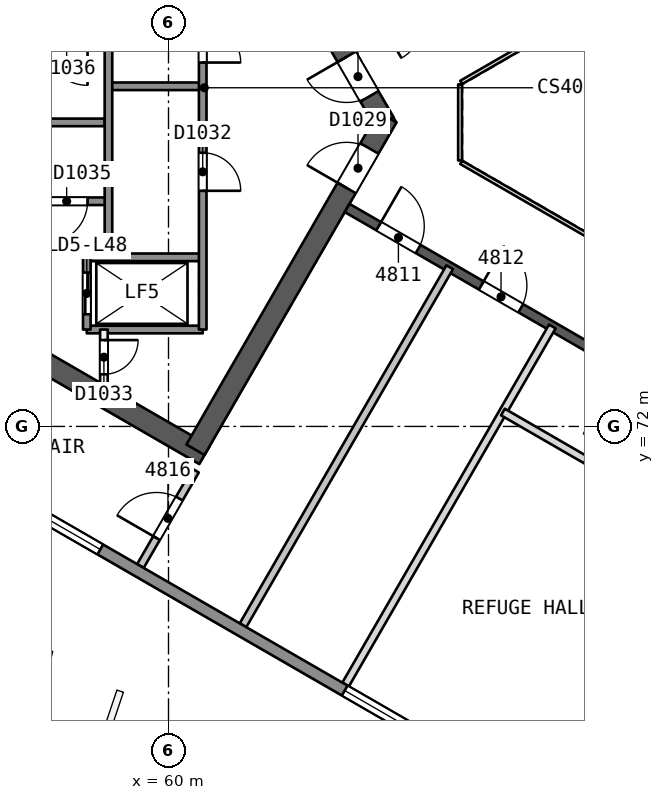
"""IFC4 building model, lengths in metres.
Left out: names, types, materials, properties, quantities, classifications, styles, units other than length and angle.
Written with IfcOpenShell. Run it as: python <this file> out.ifc"""

import sys

from ifc_helpers import new_model, si_unit, direction, frame, frame_2d, origin, place, context, subcontext, project, spatial, rectangle, extrude, element, fill, save


model = new_model("IFC4")
c1 = context("Model", 3, precision=1e-05, world=origin(), true_north=direction((0.0, 1.0)))
c2 = subcontext(c1, "Body", "Model", "MODEL_VIEW")
j1 = project(units=[si_unit("LENGTHUNIT", "METRE"), si_unit("PLANEANGLEUNIT", "RADIAN")], contexts=[c1])
p1 = place(None, origin())
s1 = spatial("IfcSite", under=j1, at=p1, CompositionType="ELEMENT")
p2 = place(p1, origin())
s2 = spatial("IfcBuilding", under=s1, at=p2, CompositionType="ELEMENT")
p3 = place(p2, frame((0.0, 0.0, 197.0)))
s3 = spatial("IfcBuildingStorey", under=s2, at=p3, CompositionType="ELEMENT", Elevation=197.0)
p4 = place(p3, frame((65.682, 80.0, 0.0), z_axis=(0.0, 0.0, 1.0), x_axis=(-0.500000202252, 0.866025287014, 0.0)))
e1 = element("IfcWall", 1, at=p4, inside=s3, PredefinedType="SHEAR", context=c2, shape_type="SweptSolid", body=[
    extrude(rectangle(XDim=10.221, YDim=0.55, at=frame_2d((5.111, 0.0))), origin(), (0.0, 0.0, 1.0), 4.4),
])
p5 = place(p4, frame((0.791, 0.0, 0.0)))
e2 = element("IfcOpeningElement", 2, at=p5, cuts=e1, PredefinedType="OPENING", context=c2, shape_type="SweptSolid", body=[
    extrude(rectangle(XDim=1.2, YDim=2.1, at=frame_2d((0.6, 1.05))), frame((0.0, 0.286, 0.0), z_axis=(0.0, -1.0, 0.0), x_axis=(1.0, 0.0, 0.0)), (0.0, 0.0, 1.0), 0.571),
])
p6 = place(p3, frame((60.709, 88.614, 0.0), z_axis=(0.0, 0.0, 1.0), x_axis=(-0.866020164116, -0.500009075263, 0.0)))
e3 = element("IfcWall", 3, at=p6, inside=s3, PredefinedType="SHEAR", context=c2, shape_type="SweptSolid", body=[
    extrude(rectangle(XDim=14.058, YDim=0.55, at=frame_2d((7.029, 0.0))), origin(), (0.0, 0.0, 1.0), 4.4),
])
p7 = place(p6, frame((6.475, 0.0, 0.0)))
e4 = element("IfcOpeningElement", 4, at=p7, cuts=e3, PredefinedType="OPENING", context=c2, shape_type="SweptSolid", body=[
    extrude(rectangle(XDim=1.1, YDim=2.1, at=frame_2d((0.55, 1.05))), frame((0.0, 0.286, 0.0), z_axis=(0.0, -1.0, 0.0), x_axis=(1.0, 0.0, 0.0)), (0.0, 0.0, 1.0), 0.571),
])
p8 = place(p3, frame((48.672, 78.336, 0.0), z_axis=(0.0, 0.0, 1.0), x_axis=(0.866023530946, -0.500003243837, 0.0)))
e5 = element("IfcWall", 5, at=p8, inside=s3, PredefinedType="SHEAR", context=c2, shape_type="SweptSolid", body=[
    extrude(rectangle(XDim=14.175, YDim=0.55, at=frame_2d((7.087, 0.0))), origin(), (0.0, 0.0, 1.0), 4.4),
])
p9 = place(p3, frame((60.709, 71.386, 0.0), z_axis=(0.0, 0.0, 1.0), x_axis=(0.500015938302, 0.866016201606, 0.0)))
e6 = element("IfcWall", 6, at=p9, inside=s3, PredefinedType="SHEAR", context=c2, shape_type="SweptSolid", body=[
    extrude(rectangle(XDim=10.105, YDim=0.55, at=frame_2d((5.053, 0.0))), origin(), (0.0, 0.0, 1.0), 4.4),
])
p10 = place(p9, frame((7.955, 0.0, 0.0)))
e7 = element("IfcOpeningElement", 7, at=p10, cuts=e6, PredefinedType="OPENING", context=c2, shape_type="SweptSolid", body=[
    extrude(rectangle(XDim=1.2, YDim=2.1, at=frame_2d((0.6, 1.05))), frame((0.0, 0.286, 0.0), z_axis=(0.0, -1.0, 0.0), x_axis=(1.0, 0.0, 0.0)), (0.0, 0.0, 1.0), 0.571),
])
p11 = place(p3, frame((64.7, 77.748, 0.0), z_axis=(0.0, 0.0, 1.0), x_axis=(0.866026492143, -0.499998114903, 0.0)))
e8 = element("IfcWall", 8, at=p11, inside=s3, PredefinedType="SHEAR", context=c2, shape_type="SweptSolid", body=[
    extrude(rectangle(XDim=15.588, YDim=0.25, at=frame_2d((7.794, 0.0))), origin(), (0.0, 0.0, 1.0), 3.95),
])
p12 = place(p11, frame((0.959, 0.0, 0.0)))
e9 = element("IfcOpeningElement", 9, at=p12, cuts=e8, PredefinedType="OPENING", context=c2, shape_type="SweptSolid", body=[
    extrude(rectangle(XDim=1.2, YDim=2.4, at=frame_2d((0.6, 1.2))), frame((0.0, 0.135, 0.0), z_axis=(0.0, -1.0, 0.0), x_axis=(1.0, 0.0, 0.0)), (0.0, 0.0, 1.0), 0.271),
])
p13 = place(p11, frame((4.076, 0.0, 0.0)))
e10 = element("IfcOpeningElement", 10, at=p13, cuts=e8, PredefinedType="OPENING", context=c2, shape_type="SweptSolid", body=[
    extrude(rectangle(XDim=1.2, YDim=2.4, at=frame_2d((0.6, 1.2))), frame((0.0, 0.135, 0.0), z_axis=(0.0, -1.0, 0.0), x_axis=(1.0, 0.0, 0.0)), (0.0, 0.0, 1.0), 0.271),
])
p14 = place(p11, frame((8.753, 0.0, 0.0)))
e11 = element("IfcOpeningElement", 11, at=p14, cuts=e8, PredefinedType="OPENING", context=c2, shape_type="SweptSolid", body=[
    extrude(rectangle(XDim=1.2, YDim=2.4, at=frame_2d((0.6, 1.2))), frame((0.0, 0.135, 0.0), z_axis=(0.0, -1.0, 0.0), x_axis=(1.0, 0.0, 0.0)), (0.0, 0.0, 1.0), 0.271),
])
p15 = place(p11, frame((13.43, 0.0, 0.0)))
e12 = element("IfcOpeningElement", 12, at=p15, cuts=e8, PredefinedType="OPENING", context=c2, shape_type="SweptSolid", body=[
    extrude(rectangle(XDim=1.2, YDim=2.4, at=frame_2d((0.6, 1.2))), frame((0.0, 0.135, 0.0), z_axis=(0.0, -1.0, 0.0), x_axis=(1.0, 0.0, 0.0)), (0.0, 0.0, 1.0), 0.271),
])
p16 = place(p3, frame((61.96, 66.768, 0.0), z_axis=(0.0, 0.0, 1.0), x_axis=(0.49999829022, 0.866026390924, 0.0)))
e13 = element("IfcWall", 13, at=p16, inside=s3, PredefinedType="PARTITIONING", context=c2, shape_type="SweptSolid", body=[
    extrude(rectangle(XDim=10.879, YDim=0.2, at=frame_2d((5.44, 0.0))), origin(), (0.0, 0.0, 1.0), 3.95),
])
p17 = place(p3, frame((59.26, 68.326, 0.0), z_axis=(0.0, 0.0, 1.0), x_axis=(0.499977468037, 0.866038412228, 0.0)))
e14 = element("IfcWall", 14, at=p17, inside=s3, PredefinedType="PARTITIONING", context=c2, shape_type="SweptSolid", body=[
    extrude(rectangle(XDim=2.901, YDim=0.2, at=frame_2d((1.45, 0.0))), origin(), (0.0, 0.0, 1.0), 3.95),
])
p18 = place(p17, frame((0.85, 0.0, 0.0)))
e15 = element("IfcOpeningElement", 15, at=p18, cuts=e14, PredefinedType="OPENING", context=c2, shape_type="SweptSolid", body=[
    extrude(rectangle(XDim=1.2, YDim=2.4, at=frame_2d((0.6, 1.2))), frame((0.0, 0.11, 0.0), z_axis=(0.0, -1.0, 0.0), x_axis=(1.0, 0.0, 0.0)), (0.0, 0.0, 1.0), 0.221),
])
p19 = place(p3, frame((64.66, 65.209, 0.0), z_axis=(0.0, 0.0, 1.0), x_axis=(0.500015120401, 0.866016673841, 0.0)))
e16 = element("IfcWall", 16, at=p19, inside=s3, PredefinedType="PARTITIONING", context=c2, shape_type="SweptSolid", body=[
    extrude(rectangle(XDim=10.88, YDim=0.2, at=frame_2d((5.44, 0.0))), origin(), (0.0, 0.0, 1.0), 3.95),
])
p20 = place(p3, frame((68.8, 72.379, 0.0), z_axis=(0.0, 0.0, 1.0), x_axis=(0.866022576681, -0.500004896655, 0.0)))
e17 = element("IfcWall", 17, at=p20, inside=s3, PredefinedType="PARTITIONING", context=c2, shape_type="SweptSolid", body=[
    extrude(rectangle(XDim=6.235, YDim=0.2, at=frame_2d((3.118, 0.0))), origin(), (0.0, 0.0, 1.0), 3.95),
])
p21 = place(p20, frame((2.518, 0.0, 0.0)))
e18 = element("IfcOpeningElement", 18, at=p21, cuts=e17, PredefinedType="OPENING", context=c2, shape_type="SweptSolid", body=[
    extrude(rectangle(XDim=1.2, YDim=2.4, at=frame_2d((0.6, 1.2))), frame((0.0, 0.11, 0.0), z_axis=(0.0, -1.0, 0.0), x_axis=(1.0, 0.0, 0.0)), (0.0, 0.0, 1.0), 0.221),
])
p22 = place(p3, frame((70.06, 62.091, 0.0), z_axis=(0.0, 0.0, 1.0), x_axis=(0.49999829022, 0.866026390924, 0.0)))
e19 = element("IfcWall", 19, at=p22, inside=s3, PredefinedType="PARTITIONING", context=c2, shape_type="SweptSolid", body=[
    extrude(rectangle(XDim=10.879, YDim=0.2, at=frame_2d((5.44, 0.0))), origin(), (0.0, 0.0, 1.0), 3.95),
])
p23 = place(p3, frame((88.51, 51.267, 0.0), z_axis=(0.0, 0.0, 1.0), x_axis=(-0.866025243948, 0.500000276845, 0.0)))
e20 = element("IfcWall", 20, at=p23, inside=s3, PredefinedType="SOLIDWALL", context=c2, shape_type="SweptSolid", body=[
    extrude(rectangle(XDim=52.132, YDim=0.3, at=frame_2d((26.066, 0.0))), origin(), (0.0, 0.0, 1.0), 3.95),
])
p24 = place(p23, frame((42.139, 0.0, 0.9)))
e21 = element("IfcOpeningElement", 21, at=p24, cuts=e20, PredefinedType="OPENING", context=c2, shape_type="SweptSolid", body=[
    extrude(rectangle(XDim=1.8, YDim=1.5, at=frame_2d((0.9, 0.75))), frame((0.0, 0.161, 0.0), z_axis=(0.0, -1.0, 0.0), x_axis=(1.0, 0.0, 0.0)), (0.0, 0.0, 1.0), 0.321),
])
p25 = place(p23, frame((8.193, 0.0, 0.9)))
e22 = element("IfcOpeningElement", 22, at=p25, cuts=e20, PredefinedType="OPENING", context=c2, shape_type="SweptSolid", body=[
    extrude(rectangle(XDim=1.8, YDim=1.5, at=frame_2d((0.9, 0.75))), frame((0.0, 0.161, 0.0), z_axis=(0.0, -1.0, 0.0), x_axis=(1.0, 0.0, 0.0)), (0.0, 0.0, 1.0), 0.321),
])
p26 = place(p23, frame((3.713, 0.0, 0.6)))
e23 = element("IfcOpeningElement", 23, at=p26, cuts=e20, PredefinedType="OPENING", context=c2, shape_type="SweptSolid", body=[
    extrude(rectangle(XDim=3.0, YDim=2.4, at=frame_2d((1.5, 1.2))), frame((0.0, 0.161, 0.0), z_axis=(0.0, -1.0, 0.0), x_axis=(1.0, 0.0, 0.0)), (0.0, 0.0, 1.0), 0.321),
])
p27 = place(p23, frame((14.14, 0.0, 0.6)))
e24 = element("IfcOpeningElement", 24, at=p27, cuts=e20, PredefinedType="OPENING", context=c2, shape_type="SweptSolid", body=[
    extrude(rectangle(XDim=3.0, YDim=2.4, at=frame_2d((1.5, 1.2))), frame((0.0, 0.161, 0.0), z_axis=(0.0, -1.0, 0.0), x_axis=(1.0, 0.0, 0.0)), (0.0, 0.0, 1.0), 0.321),
])
p28 = place(p23, frame((24.566, 0.0, 0.6)))
e25 = element("IfcOpeningElement", 25, at=p28, cuts=e20, PredefinedType="OPENING", context=c2, shape_type="SweptSolid", body=[
    extrude(rectangle(XDim=3.0, YDim=2.4, at=frame_2d((1.5, 1.2))), frame((0.0, 0.161, 0.0), z_axis=(0.0, -1.0, 0.0), x_axis=(1.0, 0.0, 0.0)), (0.0, 0.0, 1.0), 0.321),
])
p29 = place(p23, frame((34.992, 0.0, 0.6)))
e26 = element("IfcOpeningElement", 26, at=p29, cuts=e20, PredefinedType="OPENING", context=c2, shape_type="SweptSolid", body=[
    extrude(rectangle(XDim=3.0, YDim=2.4, at=frame_2d((1.5, 1.2))), frame((0.0, 0.161, 0.0), z_axis=(0.0, -1.0, 0.0), x_axis=(1.0, 0.0, 0.0)), (0.0, 0.0, 1.0), 0.321),
])
p30 = place(p23, frame((45.419, 0.0, 0.6)))
e27 = element("IfcOpeningElement", 27, at=p30, cuts=e20, PredefinedType="OPENING", context=c2, shape_type="SweptSolid", body=[
    extrude(rectangle(XDim=3.0, YDim=2.4, at=frame_2d((1.5, 1.2))), frame((0.0, 0.161, 0.0), z_axis=(0.0, -1.0, 0.0), x_axis=(1.0, 0.0, 0.0)), (0.0, 0.0, 1.0), 0.321),
])
p31 = place(p3, frame((60.9, 80.95, 0.0), z_axis=(0.0, 0.0, 1.0), x_axis=(-1.0, 0.0, 0.0)))
e28 = element("IfcWall", 28, at=p31, inside=s3, PredefinedType="SOLIDWALL", context=c2, shape_type="SweptSolid", body=[
    extrude(rectangle(XDim=2.48, YDim=0.2, at=frame_2d((1.24, 0.0))), origin(), (0.0, 0.0, 1.0), 3.95),
])
p32 = place(p3, frame((58.32, 80.0, 0.0), z_axis=(0.0, 0.0, 1.0), x_axis=(-1.0, 0.0, 0.0)))
e29 = element("IfcWall", 29, at=p32, inside=s3, PredefinedType="SOLIDWALL", context=c2, shape_type="SweptSolid", body=[
    extrude(rectangle(XDim=2.2, YDim=0.2, at=frame_2d((1.1, 0.0))), origin(), (0.0, 0.0, 1.0), 3.95),
])
p33 = place(p3, frame((58.42, 77.925, 0.0), z_axis=(0.0, 0.0, 1.0), x_axis=(-1.0, 0.0, 0.0)))
e30 = element("IfcWall", 30, at=p33, inside=s3, PredefinedType="SOLIDWALL", context=c2, shape_type="SweptSolid", body=[
    extrude(rectangle(XDim=7.7, YDim=0.2, at=frame_2d((3.85, 0.0))), origin(), (0.0, 0.0, 1.0), 3.95),
])
p34 = place(p33, frame((0.55, 0.0, 0.0)))
e31 = element("IfcOpeningElement", 31, at=p34, cuts=e30, PredefinedType="OPENING", context=c2, shape_type="SweptSolid", body=[
    extrude(rectangle(XDim=1.1, YDim=2.1, at=frame_2d((0.55, 1.05))), frame((0.0, 0.11, 0.0), z_axis=(0.0, -1.0, 0.0), x_axis=(1.0, 0.0, 0.0)), (0.0, 0.0, 1.0), 0.221),
])
for number, where, z_axis, x_axis in (
    (32, (60.9, 76.45, 0.0), (0.0, 0.0, 1.0), (-1.0, 0.0, 0.0)),
    (33, (60.9, 74.55, 0.0), (0.0, 0.0, 1.0), (-1.0, 0.0, 0.0)),
):
    element("IfcWall", number, at=place(p3, frame(where, z_axis=z_axis, x_axis=x_axis)), inside=s3, PredefinedType="SOLIDWALL", context=c2, shape_type="SweptSolid", body=[
        extrude(rectangle(XDim=3.05, YDim=0.2, at=frame_2d((1.525, 0.0))), origin(), (0.0, 0.0, 1.0), 3.95),
    ])
p35 = place(p3, frame((60.9, 85.45, 0.0), z_axis=(0.0, 0.0, 1.0), x_axis=(0.0, -1.0, 0.0)))
e34 = element("IfcWall", 34, at=p35, inside=s3, PredefinedType="SOLIDWALL", context=c2, shape_type="SweptSolid", body=[
    extrude(rectangle(XDim=10.9, YDim=0.2, at=frame_2d((5.45, 0.0))), origin(), (0.0, 0.0, 1.0), 3.95),
])
p36 = place(p35, frame((0.625, 0.0, 0.0)))
e35 = element("IfcOpeningElement", 35, at=p36, cuts=e34, PredefinedType="OPENING", context=c2, shape_type="SweptSolid", body=[
    extrude(rectangle(XDim=1.0, YDim=2.1, at=frame_2d((0.5, 1.05))), frame((0.0, 0.11, 0.0), z_axis=(0.0, -1.0, 0.0), x_axis=(1.0, 0.0, 0.0)), (0.0, 0.0, 1.0), 0.221),
])
p37 = place(p35, frame((2.875, 0.0, 0.0)))
e36 = element("IfcOpeningElement", 36, at=p37, cuts=e34, PredefinedType="OPENING", context=c2, shape_type="SweptSolid", body=[
    extrude(rectangle(XDim=1.0, YDim=2.1, at=frame_2d((0.5, 1.05))), frame((0.0, 0.11, 0.0), z_axis=(0.0, -1.0, 0.0), x_axis=(1.0, 0.0, 0.0)), (0.0, 0.0, 1.0), 0.221),
])
p38 = place(p35, frame((6.25, 0.0, 0.0)))
e37 = element("IfcOpeningElement", 37, at=p38, cuts=e34, PredefinedType="OPENING", context=c2, shape_type="SweptSolid", body=[
    extrude(rectangle(XDim=1.0, YDim=2.1, at=frame_2d((0.5, 1.05))), frame((0.0, 0.11, 0.0), z_axis=(0.0, -1.0, 0.0), x_axis=(1.0, 0.0, 0.0)), (0.0, 0.0, 1.0), 0.221),
])
p39 = place(p3, frame((58.42, 86.974, 0.0), z_axis=(0.0, 0.0, 1.0), x_axis=(0.0, -1.0, 0.0)))
e38 = element("IfcWall", 38, at=p39, inside=s3, PredefinedType="SOLIDWALL", context=c2, shape_type="SweptSolid", body=[
    extrude(rectangle(XDim=10.524, YDim=0.2, at=frame_2d((5.262, 0.0))), origin(), (0.0, 0.0, 1.0), 3.95),
])
p40 = place(p39, frame((0.312, 0.0, 0.0)))
e39 = element("IfcOpeningElement", 39, at=p40, cuts=e38, PredefinedType="OPENING", context=c2, shape_type="SweptSolid", body=[
    extrude(rectangle(XDim=0.9, YDim=2.1, at=frame_2d((0.45, 1.05))), frame((0.0, 0.11, 0.0), z_axis=(0.0, -1.0, 0.0), x_axis=(1.0, 0.0, 0.0)), (0.0, 0.0, 1.0), 0.221),
])
p41 = place(p3, frame((58.3, 74.55, 0.0), z_axis=(0.0, 0.0, 1.0), x_axis=(0.0, -1.0, 0.0)))
e40 = element("IfcWall", 40, at=p41, inside=s3, PredefinedType="PARTITIONING", context=c2, shape_type="SweptSolid", body=[
    extrude(rectangle(XDim=1.455, YDim=0.2, at=frame_2d((0.728, 0.0))), origin(), (0.0, 0.0, 1.0), 3.95),
])
p42 = place(p41, frame((0.278, 0.0, 0.0)))
e41 = element("IfcOpeningElement", 41, at=p42, cuts=e40, PredefinedType="OPENING", context=c2, shape_type="SweptSolid", body=[
    extrude(rectangle(XDim=0.9, YDim=2.1, at=frame_2d((0.45, 1.05))), frame((0.0, 0.11, 0.0), z_axis=(0.0, -1.0, 0.0), x_axis=(1.0, 0.0, 0.0)), (0.0, 0.0, 1.0), 0.221),
])
p43 = place(p3, frame((57.85, 76.45, 0.0), z_axis=(0.0, 0.0, 1.0), x_axis=(0.0, -1.0, 0.0)))
e42 = element("IfcWall", 42, at=p43, inside=s3, PredefinedType="SOLIDWALL", context=c2, shape_type="SweptSolid", body=[
    extrude(rectangle(XDim=1.9, YDim=0.2, at=frame_2d((0.95, 0.0))), origin(), (0.0, 0.0, 1.0), 3.95),
])
p44 = place(p43, frame((0.4, 0.0, 0.0)))
e43 = element("IfcOpeningElement", 43, at=p44, cuts=e42, PredefinedType="OPENING", context=c2, shape_type="SweptSolid", body=[
    extrude(rectangle(XDim=1.1, YDim=2.1, at=frame_2d((0.55, 1.05))), frame((0.0, 0.11, 0.0), z_axis=(0.0, -1.0, 0.0), x_axis=(1.0, 0.0, 0.0)), (0.0, 0.0, 1.0), 0.221),
])
p45 = place(p3, frame((77.738, 86.846, 0.0), z_axis=(0.0, 0.0, 1.0), x_axis=(-0.866026658274, -0.499997827154, 0.0)))
e44 = element("IfcWall", 44, at=p45, inside=s3, PredefinedType="PARTITIONING", context=c2, shape_type="SweptSolid", body=[
    extrude(rectangle(XDim=11.588, YDim=0.1, at=frame_2d((5.794, 0.0))), origin(), (0.0, 0.0, 1.0), 3.95),
])
p46 = place(p3, frame((67.672, 81.0, 0.0), z_axis=(0.0, 0.0, 1.0), x_axis=(0.0, -1.0, 0.0)))
e45 = element("IfcWall", 45, at=p46, inside=s3, PredefinedType="PARTITIONING", context=c2, shape_type="SweptSolid", body=[
    extrude(rectangle(XDim=2.0, YDim=0.1, at=frame_2d((1.0, 0.0))), origin(), (0.0, 0.0, 1.0), 3.95),
])
p47 = place(p3, frame((67.702, 78.948, 0.0), z_axis=(0.0, 0.0, 1.0), x_axis=(0.866026658274, -0.499997827154, 0.0)))
e46 = element("IfcWall", 46, at=p47, inside=s3, PredefinedType="PARTITIONING", context=c2, shape_type="SweptSolid", body=[
    extrude(rectangle(XDim=11.588, YDim=0.1, at=frame_2d((5.794, 0.0))), origin(), (0.0, 0.0, 1.0), 3.95),
])
p48 = place(p12, origin())
e47 = element("IfcDoor", 47, at=p48, inside=s3, OperationType="SINGLE_SWING_LEFT", PredefinedType="NOTDEFINED", context=c2, shape_type="SweptSolid", body=[
    extrude(rectangle(XDim=1.2, YDim=2.4, at=frame_2d((0.6, 1.2))), frame((0.0, 0.025, 0.0), z_axis=(0.0, -1.0, 0.0), x_axis=(1.0, 0.0, 0.0)), (0.0, 0.0, 1.0), 0.05),
])
fill(e9, e47)
p49 = place(p13, origin())
e48 = element("IfcDoor", 48, at=p49, inside=s3, OperationType="SINGLE_SWING_LEFT", PredefinedType="NOTDEFINED", context=c2, shape_type="SweptSolid", body=[
    extrude(rectangle(XDim=1.2, YDim=2.4, at=frame_2d((0.6, 1.2))), frame((0.0, 0.025, 0.0), z_axis=(0.0, -1.0, 0.0), x_axis=(1.0, 0.0, 0.0)), (0.0, 0.0, 1.0), 0.05),
])
fill(e10, e48)
p50 = place(p18, origin())
e49 = element("IfcDoor", 49, at=p50, inside=s3, OperationType="SINGLE_SWING_LEFT", PredefinedType="NOTDEFINED", context=c2, shape_type="SweptSolid", body=[
    extrude(rectangle(XDim=1.2, YDim=2.4, at=frame_2d((0.6, 1.2))), frame((0.0, 0.025, 0.0), z_axis=(0.0, -1.0, 0.0), x_axis=(1.0, 0.0, 0.0)), (0.0, 0.0, 1.0), 0.05),
])
fill(e15, e49)
p51 = place(p28, origin())
e50 = element("IfcWindow", 50, at=p51, inside=s3, PartitioningType="SINGLE_PANEL", PredefinedType="WINDOW", context=c2, shape_type="SweptSolid", body=[
    extrude(rectangle(XDim=3.0, YDim=2.4, at=frame_2d((1.5, 1.2))), frame((0.0, 0.03, 0.0), z_axis=(0.0, -1.0, 0.0), x_axis=(1.0, 0.0, 0.0)), (0.0, 0.0, 1.0), 0.06),
])
fill(e25, e50)
p52 = place(p29, origin())
e51 = element("IfcWindow", 51, at=p52, inside=s3, PartitioningType="SINGLE_PANEL", PredefinedType="WINDOW", context=c2, shape_type="SweptSolid", body=[
    extrude(rectangle(XDim=3.0, YDim=2.4, at=frame_2d((1.5, 1.2))), frame((0.0, 0.03, 0.0), z_axis=(0.0, -1.0, 0.0), x_axis=(1.0, 0.0, 0.0)), (0.0, 0.0, 1.0), 0.06),
])
fill(e26, e51)
p53 = place(p5, origin())
e52 = element("IfcDoor", 52, at=p53, inside=s3, OperationType="SINGLE_SWING_RIGHT", PredefinedType="NOTDEFINED", context=c2, shape_type="SweptSolid", body=[
    extrude(rectangle(XDim=1.2, YDim=2.1, at=frame_2d((0.6, 1.05))), frame((0.0, 0.025, 0.0), z_axis=(0.0, -1.0, 0.0), x_axis=(1.0, 0.0, 0.0)), (0.0, 0.0, 1.0), 0.05),
])
fill(e2, e52)
p54 = place(p10, origin())
e53 = element("IfcDoor", 53, at=p54, inside=s3, OperationType="SINGLE_SWING_LEFT", PredefinedType="NOTDEFINED", context=c2, shape_type="SweptSolid", body=[
    extrude(rectangle(XDim=1.2, YDim=2.1, at=frame_2d((0.6, 1.05))), frame((0.0, 0.025, 0.0), z_axis=(0.0, -1.0, 0.0), x_axis=(1.0, 0.0, 0.0)), (0.0, 0.0, 1.0), 0.05),
])
fill(e7, e53)
p55 = place(p44, origin())
e54 = element("IfcDoor", 54, at=p55, inside=s3, OperationType="SLIDING_TO_RIGHT", PredefinedType="NOTDEFINED", context=c2, shape_type="SweptSolid", body=[
    extrude(rectangle(XDim=1.1, YDim=2.1, at=frame_2d((0.55, 1.05))), frame((0.0, 0.025, 0.0), z_axis=(0.0, -1.0, 0.0), x_axis=(1.0, 0.0, 0.0)), (0.0, 0.0, 1.0), 0.05),
])
fill(e43, e54)
p56 = place(p37, origin())
e55 = element("IfcDoor", 55, at=p56, inside=s3, OperationType="SINGLE_SWING_RIGHT", PredefinedType="NOTDEFINED", context=c2, shape_type="SweptSolid", body=[
    extrude(rectangle(XDim=1.0, YDim=2.1, at=frame_2d((0.5, 1.05))), frame((0.0, 0.025, 0.0), z_axis=(0.0, -1.0, 0.0), x_axis=(1.0, 0.0, 0.0)), (0.0, 0.0, 1.0), 0.05),
])
fill(e36, e55)
p57 = place(p38, origin())
e56 = element("IfcDoor", 56, at=p57, inside=s3, OperationType="SINGLE_SWING_RIGHT", PredefinedType="NOTDEFINED", context=c2, shape_type="SweptSolid", body=[
    extrude(rectangle(XDim=1.0, YDim=2.1, at=frame_2d((0.5, 1.05))), frame((0.0, 0.025, 0.0), z_axis=(0.0, -1.0, 0.0), x_axis=(1.0, 0.0, 0.0)), (0.0, 0.0, 1.0), 0.05),
])
fill(e37, e56)
p58 = place(p42, origin())
e57 = element("IfcDoor", 57, at=p58, inside=s3, OperationType="SINGLE_SWING_LEFT", PredefinedType="NOTDEFINED", context=c2, shape_type="SweptSolid", body=[
    extrude(rectangle(XDim=0.9, YDim=2.1, at=frame_2d((0.45, 1.05))), frame((0.0, 0.025, 0.0), z_axis=(0.0, -1.0, 0.0), x_axis=(1.0, 0.0, 0.0)), (0.0, 0.0, 1.0), 0.05),
])
fill(e41, e57)
p59 = place(p34, origin())
e58 = element("IfcDoor", 58, at=p59, inside=s3, OperationType="SINGLE_SWING_RIGHT", PredefinedType="NOTDEFINED", context=c2, shape_type="SweptSolid", body=[
    extrude(rectangle(XDim=1.1, YDim=2.1, at=frame_2d((0.55, 1.05))), frame((0.0, 0.025, 0.0), z_axis=(0.0, -1.0, 0.0), x_axis=(1.0, 0.0, 0.0)), (0.0, 0.0, 1.0), 0.05),
])
fill(e31, e58)
save(model, sys.argv[1])
